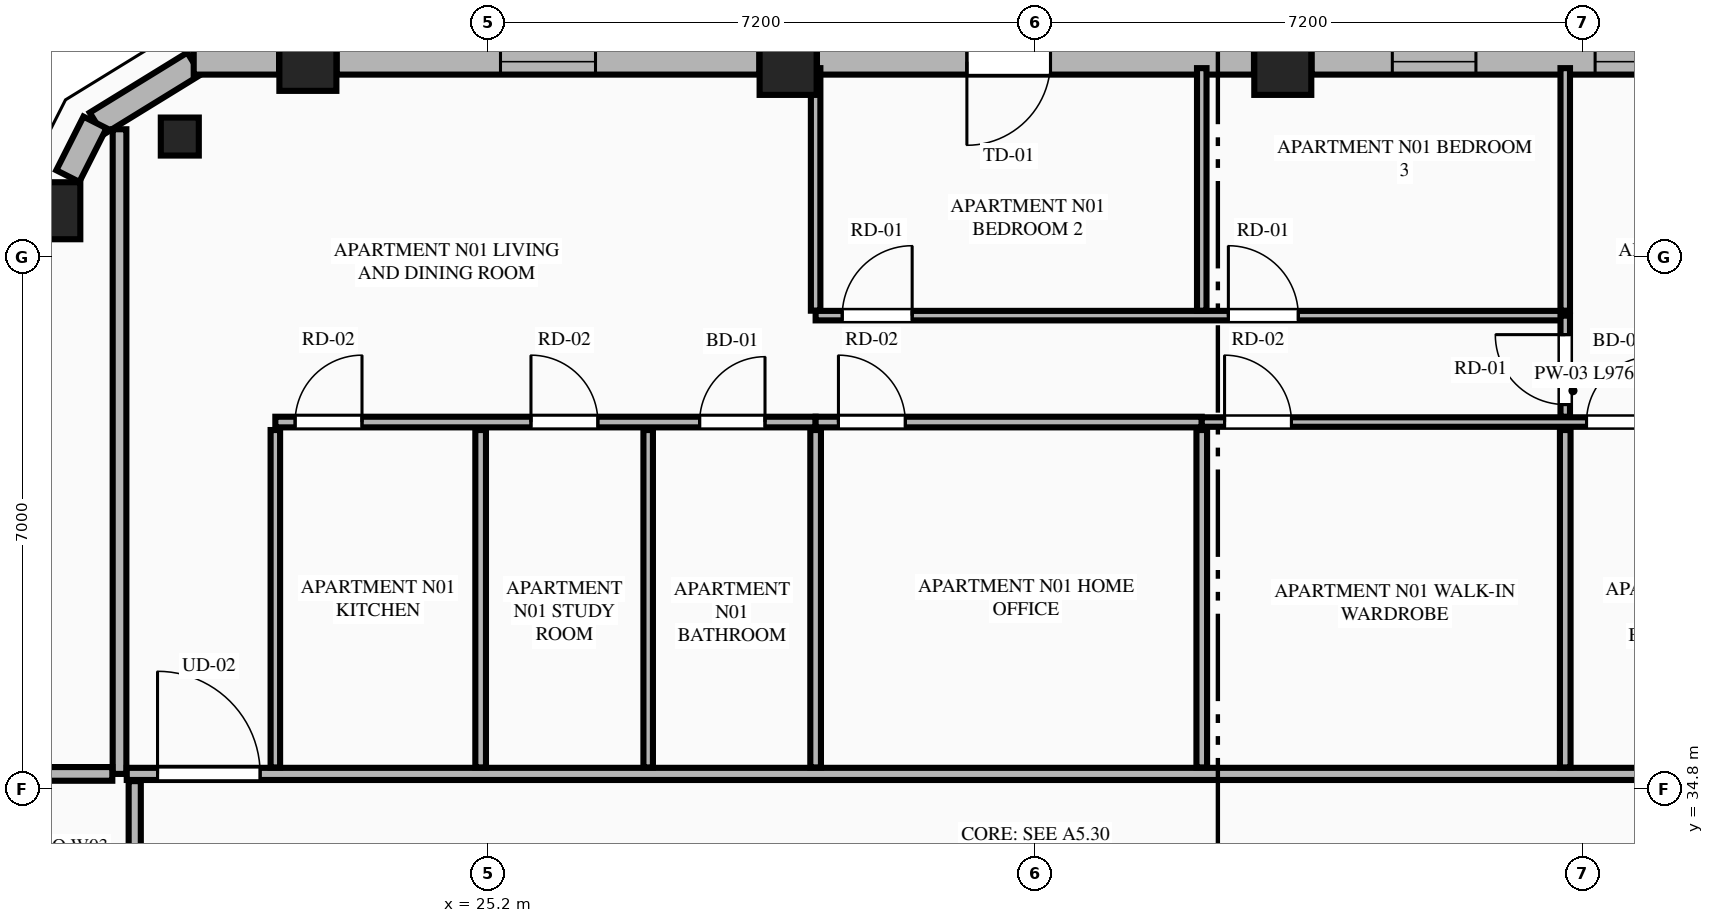
"""IFC4 building model, lengths in metres.
Left out: names, types, materials, properties, quantities, classifications, styles, units other than length and angle.
Written with IfcOpenShell. Run it as: python <this file> out.ifc"""

import sys

from ifc_helpers import new_model, si_unit, direction, frame, frame_2d, origin, origin_2d, place, context, subcontext, project, spatial, rectangle, extrude, element, fill, save


model = new_model("IFC4")
c1 = context("Model", 3, precision=1e-05, world=origin(), true_north=direction((0.0, 1.0)))
c2 = subcontext(c1, "Body", "Model", "MODEL_VIEW")
j1 = project(units=[si_unit("LENGTHUNIT", "METRE"), si_unit("PLANEANGLEUNIT", "RADIAN")], contexts=[c1])
p1 = place(None, origin())
s1 = spatial("IfcSite", under=j1, at=p1, CompositionType="ELEMENT")
p2 = place(p1, origin())
s2 = spatial("IfcBuilding", under=s1, at=p2, CompositionType="ELEMENT")
p3 = place(p2, frame((0.0, 0.0, 245.25)))
s3 = spatial("IfcBuildingStorey", under=s2, at=p3, CompositionType="ELEMENT", Elevation=245.25)
for number, where, z_axis, x_axis in (
    (1, (35.654, 44.308, 0.0), (0.0, 0.0, 1.0), (1.0, 0.0, 0.0)),
    (2, (29.146, 44.308, 0.0), (0.0, 0.0, 1.0), (1.0, 0.0, 0.0)),
    (3, (22.828, 44.361, 0.0), (0.0, 0.0, 1.0), (1.0, 0.0, 0.0)),
    (4, (19.459, 42.409, 0.0), (0.0, 0.0, 1.0), (1.0, 0.0, 0.0)),
):
    element("IfcColumn", number, at=place(p3, frame(where, z_axis=z_axis, x_axis=x_axis)), inside=s3, PredefinedType="COLUMN", context=c2, shape_type="SweptSolid", body=[
        extrude(rectangle(XDim=0.75, YDim=0.75, at=origin_2d()), origin(), (0.0, 0.0, 1.0), 3.65),
    ])
p4 = place(p3, frame((21.143, 43.385, 0.0), z_axis=(0.0, 0.0, 1.0), x_axis=(-0.865256437757, -0.501329529272, 0.0)))
e5 = element("IfcColumn", 5, at=p4, inside=s3, PredefinedType="PILASTER", context=c2, shape_type="SweptSolid", body=[
    extrude(rectangle(XDim=0.5, YDim=0.35, at=origin_2d()), origin(), (0.0, 0.0, 1.0), 3.65),
])
p5 = place(p3, frame((21.331, 44.345, 0.0), z_axis=(0.0, 0.0, 1.0), x_axis=(-0.851680557619, -0.52406128246, 0.0)))
e6 = element("IfcWall", 6, at=p5, inside=s3, PredefinedType="STANDARD", context=c2, shape_type="SweptSolid", body=[
    extrude(rectangle(XDim=1.508, YDim=0.34, at=frame_2d((0.754, 0.0))), origin(), (0.0, 0.0, 1.0), 3.45),
])
p6 = place(p3, frame((41.593, 44.37, 0.0), z_axis=(0.0, 0.0, 1.0), x_axis=(-1.0, 0.0, 0.0)))
e7 = element("IfcWall", 7, at=p6, inside=s3, PredefinedType="STANDARD", context=c2, shape_type="SweptSolid", body=[
    extrude(rectangle(XDim=5.56, YDim=0.34, at=frame_2d((2.78, 0.0))), origin(), (0.0, 0.0, 1.0), 2.983),
])
p7 = place(p6, frame((0.28, 0.0, 0.75)))
e8 = element("IfcOpeningElement", 8, at=p7, cuts=e7, PredefinedType="OPENING", context=c2, shape_type="SweptSolid", body=[
    extrude(rectangle(XDim=1.55, YDim=2.05, at=frame_2d((0.775, 1.025))), frame((0.0, 0.18, 0.0), z_axis=(0.0, -1.0, 0.0), x_axis=(1.0, 0.0, 0.0)), (0.0, 0.0, 1.0), 0.36),
])
p8 = place(p6, frame((3.398, 0.0, 0.75)))
e9 = element("IfcOpeningElement", 9, at=p8, cuts=e7, PredefinedType="OPENING", context=c2, shape_type="SweptSolid", body=[
    extrude(rectangle(XDim=1.1, YDim=2.0, at=frame_2d((0.55, 1.0))), frame((0.0, 0.18, 0.0), z_axis=(0.0, -1.0, 0.0), x_axis=(1.0, 0.0, 0.0)), (0.0, 0.0, 1.0), 0.36),
])
p9 = place(p3, frame((35.275, 44.37, 0.0), z_axis=(0.0, 0.0, 1.0), x_axis=(-1.0, 0.0, 0.0)))
e10 = element("IfcWall", 10, at=p9, inside=s3, PredefinedType="STANDARD", context=c2, shape_type="SweptSolid", body=[
    extrude(rectangle(XDim=5.75, YDim=0.34, at=frame_2d((2.875, 0.0))), origin(), (0.0, 0.0, 1.0), 2.983),
])
p10 = place(p9, frame((2.677, 0.0, 0.0)))
e11 = element("IfcOpeningElement", 11, at=p10, cuts=e10, PredefinedType="OPENING", context=c2, shape_type="SweptSolid", body=[
    extrude(rectangle(XDim=1.1, YDim=2.25, at=frame_2d((0.55, 1.125))), frame((0.0, 0.18, 0.0), z_axis=(0.0, -1.0, 0.0), x_axis=(1.0, 0.0, 0.0)), (0.0, 0.0, 1.0), 0.36),
])
p11 = place(p3, frame((28.767, 44.37, 0.0), z_axis=(0.0, 0.0, 1.0), x_axis=(-1.0, 0.0, 0.0)))
e12 = element("IfcWall", 12, at=p11, inside=s3, PredefinedType="STANDARD", context=c2, shape_type="SweptSolid", body=[
    extrude(rectangle(XDim=5.56, YDim=0.34, at=frame_2d((2.78, 0.0))), origin(), (0.0, 0.0, 1.0), 2.983),
])
p12 = place(p11, frame((2.155, 0.0, 0.75)))
e13 = element("IfcOpeningElement", 13, at=p12, cuts=e12, PredefinedType="OPENING", context=c2, shape_type="SweptSolid", body=[
    extrude(rectangle(XDim=1.25, YDim=1.95, at=frame_2d((0.625, 0.975))), frame((0.0, 0.18, 0.0), z_axis=(0.0, -1.0, 0.0), x_axis=(1.0, 0.0, 0.0)), (0.0, 0.0, 1.0), 0.36),
])
p13 = place(p3, frame((22.449, 44.37, 0.0), z_axis=(0.0, 0.0, 1.0), x_axis=(-1.0, 0.0, 0.0)))
e14 = element("IfcWall", 14, at=p13, inside=s3, PredefinedType="STANDARD", context=c2, shape_type="SweptSolid", body=[
    extrude(rectangle(XDim=1.123, YDim=0.34, at=frame_2d((0.562, 0.0))), origin(), (0.0, 0.0, 1.0), 3.45),
])
p14 = place(p3, frame((20.027, 43.571, 0.0), z_axis=(0.0, 0.0, 1.0), x_axis=(-0.451404919072, -0.89231922485, 0.0)))
e15 = element("IfcWall", 15, at=p14, inside=s3, PredefinedType="STANDARD", context=c2, shape_type="SweptSolid", body=[
    extrude(rectangle(XDim=0.791, YDim=0.34, at=frame_2d((0.396, 0.0))), origin(), (0.0, 0.0, 1.0), 3.45),
])
p15 = place(p3, frame((20.35, 35.0, 0.0), z_axis=(0.0, 0.0, 1.0), x_axis=(0.0, 1.0, 0.0)))
e16 = element("IfcWall", 16, at=p15, inside=s3, PredefinedType="PARTITIONING", context=c2, shape_type="SweptSolid", body=[
    extrude(rectangle(XDim=8.481, YDim=0.18, at=frame_2d((4.24, 0.0))), origin(), (0.0, 0.0, 1.0), 3.45),
])
p16 = place(p3, frame((20.445, 35.0, 0.0), z_axis=(0.0, 0.0, 1.0), x_axis=(1.0, 0.0, 0.0)))
e17 = element("IfcWall", 17, at=p16, inside=s3, PredefinedType="PARTITIONING", context=c2, shape_type="SweptSolid", body=[
    extrude(rectangle(XDim=23.91, YDim=0.16, at=frame_2d((11.955, 0.0))), origin(), (0.0, 0.0, 1.0), 3.45),
])
p17 = place(p16, frame((0.405, 0.0, 0.0)))
e18 = element("IfcOpeningElement", 18, at=p17, cuts=e17, PredefinedType="OPENING", context=c2, shape_type="SweptSolid", body=[
    extrude(rectangle(XDim=1.35, YDim=2.35, at=frame_2d((0.675, 1.175))), frame((0.0, 0.09, 0.0), z_axis=(0.0, -1.0, 0.0), x_axis=(1.0, 0.0, 0.0)), (0.0, 0.0, 1.0), 0.18),
])
p18 = place(p3, frame((22.4, 35.085, 0.0), z_axis=(0.0, 0.0, 1.0), x_axis=(0.0, 1.0, 0.0)))
e19 = element("IfcWall", 19, at=p18, inside=s3, PredefinedType="PARTITIONING", context=c2, shape_type="SweptSolid", body=[
    extrude(rectangle(XDim=4.439, YDim=0.125, at=frame_2d((2.219, 0.0))), origin(), (0.0, 0.0, 1.0), 3.45),
])
p19 = place(p3, frame((22.4, 39.629, 0.0), z_axis=(0.0, 0.0, 1.0), x_axis=(1.0, 0.0, 0.0)))
e20 = element("IfcWall", 20, at=p19, inside=s3, PredefinedType="PLUMBINGWALL", context=c2, shape_type="SweptSolid", body=[
    extrude(rectangle(XDim=7.108, YDim=0.14, at=frame_2d((3.554, 0.0))), origin(), (0.0, 0.0, 1.0), 3.45),
])
p20 = place(p19, frame((5.582, 0.0, 0.0)))
e21 = element("IfcOpeningElement", 21, at=p20, cuts=e20, PredefinedType="OPENING", context=c2, shape_type="SweptSolid", body=[
    extrude(rectangle(XDim=0.86, YDim=2.1, at=frame_2d((0.43, 1.05))), frame((0.0, 0.08, 0.0), z_axis=(0.0, -1.0, 0.0), x_axis=(1.0, 0.0, 0.0)), (0.0, 0.0, 1.0), 0.16),
])
p21 = place(p19, frame((0.26, 0.0, 0.0)))
e22 = element("IfcOpeningElement", 22, at=p21, cuts=e20, PredefinedType="OPENING", context=c2, shape_type="SweptSolid", body=[
    extrude(rectangle(XDim=0.88, YDim=2.15, at=frame_2d((0.44, 1.075))), frame((0.0, 0.08, 0.0), z_axis=(0.0, -1.0, 0.0), x_axis=(1.0, 0.0, 0.0)), (0.0, 0.0, 1.0), 0.16),
])
p22 = place(p19, frame((3.363, 0.0, 0.0)))
e23 = element("IfcOpeningElement", 23, at=p22, cuts=e20, PredefinedType="OPENING", context=c2, shape_type="SweptSolid", body=[
    extrude(rectangle(XDim=0.88, YDim=2.15, at=frame_2d((0.44, 1.075))), frame((0.0, 0.08, 0.0), z_axis=(0.0, -1.0, 0.0), x_axis=(1.0, 0.0, 0.0)), (0.0, 0.0, 1.0), 0.16),
])
p23 = place(p3, frame((29.508, 39.629, 0.0), z_axis=(0.0, 0.0, 1.0), x_axis=(1.0, 0.0, 0.0)))
e24 = element("IfcWall", 24, at=p23, inside=s3, PredefinedType="PLUMBINGWALL", context=c2, shape_type="SweptSolid", body=[
    extrude(rectangle(XDim=5.08, YDim=0.14, at=frame_2d((2.54, 0.0))), origin(), (0.0, 0.0, 1.0), 3.45),
])
p24 = place(p23, frame((0.3, 0.0, 0.0)))
e25 = element("IfcOpeningElement", 25, at=p24, cuts=e24, PredefinedType="OPENING", context=c2, shape_type="SweptSolid", body=[
    extrude(rectangle(XDim=0.88, YDim=2.15, at=frame_2d((0.44, 1.075))), frame((0.0, 0.08, 0.0), z_axis=(0.0, -1.0, 0.0), x_axis=(1.0, 0.0, 0.0)), (0.0, 0.0, 1.0), 0.16),
])
p25 = place(p3, frame((34.588, 39.629, 0.0), z_axis=(0.0, 0.0, 1.0), x_axis=(1.0, 0.0, 0.0)))
e26 = element("IfcWall", 26, at=p25, inside=s3, PredefinedType="PARTITIONING", context=c2, shape_type="SweptSolid", body=[
    extrude(rectangle(XDim=9.767, YDim=0.125, at=frame_2d((4.884, 0.0))), origin(), (0.0, 0.0, 1.0), 3.45),
])
p26 = place(p25, frame((5.062, 0.0, 0.0)))
e27 = element("IfcOpeningElement", 27, at=p26, cuts=e26, PredefinedType="OPENING", context=c2, shape_type="SweptSolid", body=[
    extrude(rectangle(XDim=0.86, YDim=2.1, at=frame_2d((0.43, 1.05))), frame((0.0, 0.073, 0.0), z_axis=(0.0, -1.0, 0.0), x_axis=(1.0, 0.0, 0.0)), (0.0, 0.0, 1.0), 0.145),
])
p27 = place(p25, frame((8.15, 0.0, 0.0)))
e28 = element("IfcOpeningElement", 28, at=p27, cuts=e26, PredefinedType="OPENING", context=c2, shape_type="SweptSolid", body=[
    extrude(rectangle(XDim=0.88, YDim=2.15, at=frame_2d((0.44, 1.075))), frame((0.0, 0.073, 0.0), z_axis=(0.0, -1.0, 0.0), x_axis=(1.0, 0.0, 0.0)), (0.0, 0.0, 1.0), 0.145),
])
p28 = place(p25, frame((0.3, 0.0, 0.0)))
e29 = element("IfcOpeningElement", 29, at=p28, cuts=e26, PredefinedType="OPENING", context=c2, shape_type="SweptSolid", body=[
    extrude(rectangle(XDim=0.88, YDim=2.15, at=frame_2d((0.44, 1.075))), frame((0.0, 0.073, 0.0), z_axis=(0.0, -1.0, 0.0), x_axis=(1.0, 0.0, 0.0)), (0.0, 0.0, 1.0), 0.145),
])
p29 = place(p3, frame((25.101, 35.085, 0.0), z_axis=(0.0, 0.0, 1.0), x_axis=(0.0, 1.0, 0.0)))
e30 = element("IfcWall", 30, at=p29, inside=s3, PredefinedType="PLUMBINGWALL", context=c2, shape_type="SweptSolid", body=[
    extrude(rectangle(XDim=4.439, YDim=0.14, at=frame_2d((2.219, 0.0))), origin(), (0.0, 0.0, 1.0), 3.45),
])
p30 = place(p3, frame((27.305, 35.085, 0.0), z_axis=(0.0, 0.0, 1.0), x_axis=(0.0, 1.0, 0.0)))
e31 = element("IfcWall", 31, at=p30, inside=s3, PredefinedType="PARTITIONING", context=c2, shape_type="SweptSolid", body=[
    extrude(rectangle(XDim=4.439, YDim=0.125, at=frame_2d((2.219, 0.0))), origin(), (0.0, 0.0, 1.0), 3.45),
])
p31 = place(p3, frame((29.508, 41.094, 0.0), z_axis=(0.0, 0.0, 1.0), x_axis=(0.0, 1.0, 0.0)))
e32 = element("IfcWall", 32, at=p31, inside=s3, PredefinedType="PARTITIONING", context=c2, shape_type="SweptSolid", body=[
    extrude(rectangle(XDim=3.191, YDim=0.125, at=frame_2d((1.595, 0.0))), origin(), (0.0, 0.0, 1.0), 3.45),
])
p32 = place(p3, frame((29.508, 41.029, 0.0), z_axis=(0.0, 0.0, 1.0), x_axis=(1.0, 0.0, 0.0)))
e33 = element("IfcWall", 33, at=p32, inside=s3, PredefinedType="PARTITIONING", context=c2, shape_type="SweptSolid", body=[
    extrude(rectangle(XDim=9.862, YDim=0.125, at=frame_2d((4.931, 0.0))), origin(), (0.0, 0.0, 1.0), 3.45),
])
p33 = place(p32, frame((0.35, 0.0, 0.0)))
e34 = element("IfcOpeningElement", 34, at=p33, cuts=e33, PredefinedType="OPENING", context=c2, shape_type="SweptSolid", body=[
    extrude(rectangle(XDim=0.92, YDim=2.15, at=frame_2d((0.46, 1.075))), frame((0.0, 0.073, 0.0), z_axis=(0.0, -1.0, 0.0), x_axis=(1.0, 0.0, 0.0)), (0.0, 0.0, 1.0), 0.145),
])
p34 = place(p32, frame((5.43, 0.0, 0.0)))
e35 = element("IfcOpeningElement", 35, at=p34, cuts=e33, PredefinedType="OPENING", context=c2, shape_type="SweptSolid", body=[
    extrude(rectangle(XDim=0.92, YDim=2.15, at=frame_2d((0.46, 1.075))), frame((0.0, 0.073, 0.0), z_axis=(0.0, -1.0, 0.0), x_axis=(1.0, 0.0, 0.0)), (0.0, 0.0, 1.0), 0.145),
])
p35 = place(p3, frame((39.37, 39.699, 0.0), z_axis=(0.0, 0.0, 1.0), x_axis=(0.0, 1.0, 0.0)))
e36 = element("IfcWall", 36, at=p35, inside=s3, PredefinedType="PARTITIONING", context=c2, shape_type="SweptSolid", body=[
    extrude(rectangle(XDim=1.33, YDim=0.125, at=frame_2d((0.665, 0.0))), origin(), (0.0, 0.0, 1.0), 3.45),
])
p36 = place(p35, frame((0.16, 0.0, 0.0)))
e37 = element("IfcOpeningElement", 37, at=p36, cuts=e36, PredefinedType="OPENING", context=c2, shape_type="SweptSolid", body=[
    extrude(rectangle(XDim=0.92, YDim=2.15, at=frame_2d((0.46, 1.075))), frame((0.0, 0.073, 0.0), z_axis=(0.0, -1.0, 0.0), x_axis=(1.0, 0.0, 0.0)), (0.0, 0.0, 1.0), 0.145),
])
for number, where, z_axis, x_axis in (
    (38, (29.508, 35.085, 0.0), (0.0, 0.0, 1.0), (0.0, 1.0, 0.0)),
    (39, (34.588, 35.085, 0.0), (0.0, 0.0, 1.0), (0.0, 1.0, 0.0)),
):
    element("IfcWall", number, at=place(p3, frame(where, z_axis=z_axis, x_axis=x_axis)), inside=s3, PredefinedType="PLUMBINGWALL", context=c2, shape_type="SweptSolid", body=[
        extrude(rectangle(XDim=4.439, YDim=0.14, at=frame_2d((2.219, 0.0))), origin(), (0.0, 0.0, 1.0), 3.45),
    ])
for number, where, z_axis, x_axis in (
    (40, (34.588, 41.094, 0.0), (0.0, 0.0, 1.0), (0.0, 1.0, 0.0)),
    (41, (39.37, 41.094, 0.0), (0.0, 0.0, 1.0), (0.0, 1.0, 0.0)),
):
    element("IfcWall", number, at=place(p3, frame(where, z_axis=z_axis, x_axis=x_axis)), inside=s3, PredefinedType="PARTITIONING", context=c2, shape_type="SweptSolid", body=[
        extrude(rectangle(XDim=3.191, YDim=0.125, at=frame_2d((1.595, 0.0))), origin(), (0.0, 0.0, 1.0), 3.45),
    ])
p37 = place(p3, frame((39.37, 35.085, 0.0), z_axis=(0.0, 0.0, 1.0), x_axis=(0.0, 1.0, 0.0)))
e42 = element("IfcWall", 42, at=p37, inside=s3, PredefinedType="PLUMBINGWALL", context=c2, shape_type="SweptSolid", body=[
    extrude(rectangle(XDim=4.439, YDim=0.14, at=frame_2d((2.219, 0.0))), origin(), (0.0, 0.0, 1.0), 3.45),
])
p38 = place(p3, frame((15.933, 35.0, 0.0), z_axis=(0.0, 0.0, 1.0), x_axis=(1.0, 0.0, 0.0)))
e43 = element("IfcWall", 43, at=p38, inside=s3, PredefinedType="PARTITIONING", context=c2, shape_type="SweptSolid", body=[
    extrude(rectangle(XDim=4.322, YDim=0.18, at=frame_2d((2.161, 0.0))), origin(), (0.0, 0.0, 1.0), 3.45),
])
p39 = place(p3, frame((20.55, 28.957, 0.0), z_axis=(0.0, 0.0, 1.0), x_axis=(0.0, 1.0, 0.0)))
e44 = element("IfcWall", 44, at=p39, inside=s3, PredefinedType="PARTITIONING", context=c2, shape_type="SweptSolid", body=[
    extrude(rectangle(XDim=5.948, YDim=0.16, at=frame_2d((2.974, 0.0))), origin(), (0.0, 0.0, 1.0), 3.137),
])
p40 = place(p39, frame((0.4, 0.0, 0.0)))
e45 = element("IfcOpeningElement", 45, at=p40, cuts=e44, PredefinedType="OPENING", context=c2, shape_type="SweptSolid", body=[
    extrude(rectangle(XDim=1.02, YDim=2.25, at=frame_2d((0.51, 1.125))), frame((0.0, 0.09, 0.0), z_axis=(0.0, -1.0, 0.0), x_axis=(1.0, 0.0, 0.0)), (0.0, 0.0, 1.0), 0.18),
])
p41 = place(p7, origin())
e46 = element("IfcWindow", 46, at=p41, inside=s3, PartitioningType="SINGLE_PANEL", PredefinedType="WINDOW", context=c2, shape_type="SweptSolid", body=[
    extrude(rectangle(XDim=1.55, YDim=2.05, at=frame_2d((0.775, 1.025))), frame((0.0, 0.03, 0.0), z_axis=(0.0, -1.0, 0.0), x_axis=(1.0, 0.0, 0.0)), (0.0, 0.0, 1.0), 0.06),
])
fill(e8, e46)
p42 = place(p10, origin())
e47 = element("IfcDoor", 47, at=p42, inside=s3, OperationType="SINGLE_SWING_RIGHT", PredefinedType="DOOR", context=c2, shape_type="SweptSolid", body=[
    extrude(rectangle(XDim=1.1, YDim=2.25, at=frame_2d((0.55, 1.125))), frame((0.0, 0.025, 0.0), z_axis=(0.0, -1.0, 0.0), x_axis=(1.0, 0.0, 0.0)), (0.0, 0.0, 1.0), 0.05),
])
fill(e11, e47)
p43 = place(p12, origin())
e48 = element("IfcWindow", 48, at=p43, inside=s3, PartitioningType="SINGLE_PANEL", PredefinedType="WINDOW", context=c2, shape_type="SweptSolid", body=[
    extrude(rectangle(XDim=1.25, YDim=1.95, at=frame_2d((0.625, 0.975))), frame((0.0, 0.03, 0.0), z_axis=(0.0, -1.0, 0.0), x_axis=(1.0, 0.0, 0.0)), (0.0, 0.0, 1.0), 0.06),
])
fill(e13, e48)
p44 = place(p20, origin())
e49 = element("IfcDoor", 49, at=p44, inside=s3, OperationType="SINGLE_SWING_RIGHT", PredefinedType="DOOR", context=c2, shape_type="SweptSolid", body=[
    extrude(rectangle(XDim=0.86, YDim=2.1, at=frame_2d((0.43, 1.05))), frame((0.0, 0.025, 0.0), z_axis=(0.0, -1.0, 0.0), x_axis=(1.0, 0.0, 0.0)), (0.0, 0.0, 1.0), 0.05),
])
fill(e21, e49)
p45 = place(p26, origin())
e50 = element("IfcDoor", 50, at=p45, inside=s3, OperationType="SINGLE_SWING_RIGHT", PredefinedType="DOOR", context=c2, shape_type="SweptSolid", body=[
    extrude(rectangle(XDim=0.86, YDim=2.1, at=frame_2d((0.43, 1.05))), frame((0.0, 0.025, 0.0), z_axis=(0.0, -1.0, 0.0), x_axis=(1.0, 0.0, 0.0)), (0.0, 0.0, 1.0), 0.05),
])
fill(e27, e50)
p46 = place(p17, origin())
e51 = element("IfcDoor", 51, at=p46, inside=s3, OperationType="SINGLE_SWING_LEFT", PredefinedType="DOOR", context=c2, shape_type="SweptSolid", body=[
    extrude(rectangle(XDim=1.35, YDim=2.35, at=frame_2d((0.675, 1.175))), frame((0.0, 0.025, 0.0), z_axis=(0.0, -1.0, 0.0), x_axis=(1.0, 0.0, 0.0)), (0.0, 0.0, 1.0), 0.05),
])
fill(e18, e51)
p47 = place(p21, origin())
e52 = element("IfcDoor", 52, at=p47, inside=s3, OperationType="SINGLE_SWING_RIGHT", PredefinedType="DOOR", context=c2, shape_type="SweptSolid", body=[
    extrude(rectangle(XDim=0.88, YDim=2.15, at=frame_2d((0.44, 1.075))), frame((0.0, 0.025, 0.0), z_axis=(0.0, -1.0, 0.0), x_axis=(1.0, 0.0, 0.0)), (0.0, 0.0, 1.0), 0.05),
])
fill(e22, e52)
p48 = place(p22, origin())
e53 = element("IfcDoor", 53, at=p48, inside=s3, OperationType="SINGLE_SWING_LEFT", PredefinedType="DOOR", context=c2, shape_type="SweptSolid", body=[
    extrude(rectangle(XDim=0.88, YDim=2.15, at=frame_2d((0.44, 1.075))), frame((0.0, 0.025, 0.0), z_axis=(0.0, -1.0, 0.0), x_axis=(1.0, 0.0, 0.0)), (0.0, 0.0, 1.0), 0.05),
])
fill(e23, e53)
p49 = place(p24, origin())
e54 = element("IfcDoor", 54, at=p49, inside=s3, OperationType="SINGLE_SWING_LEFT", PredefinedType="DOOR", context=c2, shape_type="SweptSolid", body=[
    extrude(rectangle(XDim=0.88, YDim=2.15, at=frame_2d((0.44, 1.075))), frame((0.0, 0.025, 0.0), z_axis=(0.0, -1.0, 0.0), x_axis=(1.0, 0.0, 0.0)), (0.0, 0.0, 1.0), 0.05),
])
fill(e25, e54)
p50 = place(p33, origin())
e55 = element("IfcDoor", 55, at=p50, inside=s3, OperationType="SINGLE_SWING_RIGHT", PredefinedType="DOOR", context=c2, shape_type="SweptSolid", body=[
    extrude(rectangle(XDim=0.92, YDim=2.15, at=frame_2d((0.46, 1.075))), frame((0.0, 0.025, 0.0), z_axis=(0.0, -1.0, 0.0), x_axis=(1.0, 0.0, 0.0)), (0.0, 0.0, 1.0), 0.05),
])
fill(e34, e55)
p51 = place(p34, origin())
e56 = element("IfcDoor", 56, at=p51, inside=s3, OperationType="SINGLE_SWING_LEFT", PredefinedType="DOOR", context=c2, shape_type="SweptSolid", body=[
    extrude(rectangle(XDim=0.92, YDim=2.15, at=frame_2d((0.46, 1.075))), frame((0.0, 0.025, 0.0), z_axis=(0.0, -1.0, 0.0), x_axis=(1.0, 0.0, 0.0)), (0.0, 0.0, 1.0), 0.05),
])
fill(e35, e56)
p52 = place(p36, origin())
e57 = element("IfcDoor", 57, at=p52, inside=s3, OperationType="SINGLE_SWING_RIGHT", PredefinedType="DOOR", context=c2, shape_type="SweptSolid", body=[
    extrude(rectangle(XDim=0.92, YDim=2.15, at=frame_2d((0.46, 1.075))), frame((0.0, 0.025, 0.0), z_axis=(0.0, -1.0, 0.0), x_axis=(1.0, 0.0, 0.0)), (0.0, 0.0, 1.0), 0.05),
])
fill(e37, e57)
p53 = place(p28, origin())
e58 = element("IfcDoor", 58, at=p53, inside=s3, OperationType="SINGLE_SWING_LEFT", PredefinedType="DOOR", context=c2, shape_type="SweptSolid", body=[
    extrude(rectangle(XDim=0.88, YDim=2.15, at=frame_2d((0.44, 1.075))), frame((0.0, 0.025, 0.0), z_axis=(0.0, -1.0, 0.0), x_axis=(1.0, 0.0, 0.0)), (0.0, 0.0, 1.0), 0.05),
])
fill(e29, e58)
p54 = place(p8, origin())
e59 = element("IfcWindow", 59, at=p54, inside=s3, PartitioningType="SINGLE_PANEL", PredefinedType="WINDOW", context=c2, shape_type="SweptSolid", body=[
    extrude(rectangle(XDim=1.1, YDim=2.0, at=frame_2d((0.55, 1.0))), frame((0.0, 0.03, 0.0), z_axis=(0.0, -1.0, 0.0), x_axis=(1.0, 0.0, 0.0)), (0.0, 0.0, 1.0), 0.06),
])
fill(e9, e59)
save(model, sys.argv[1])
